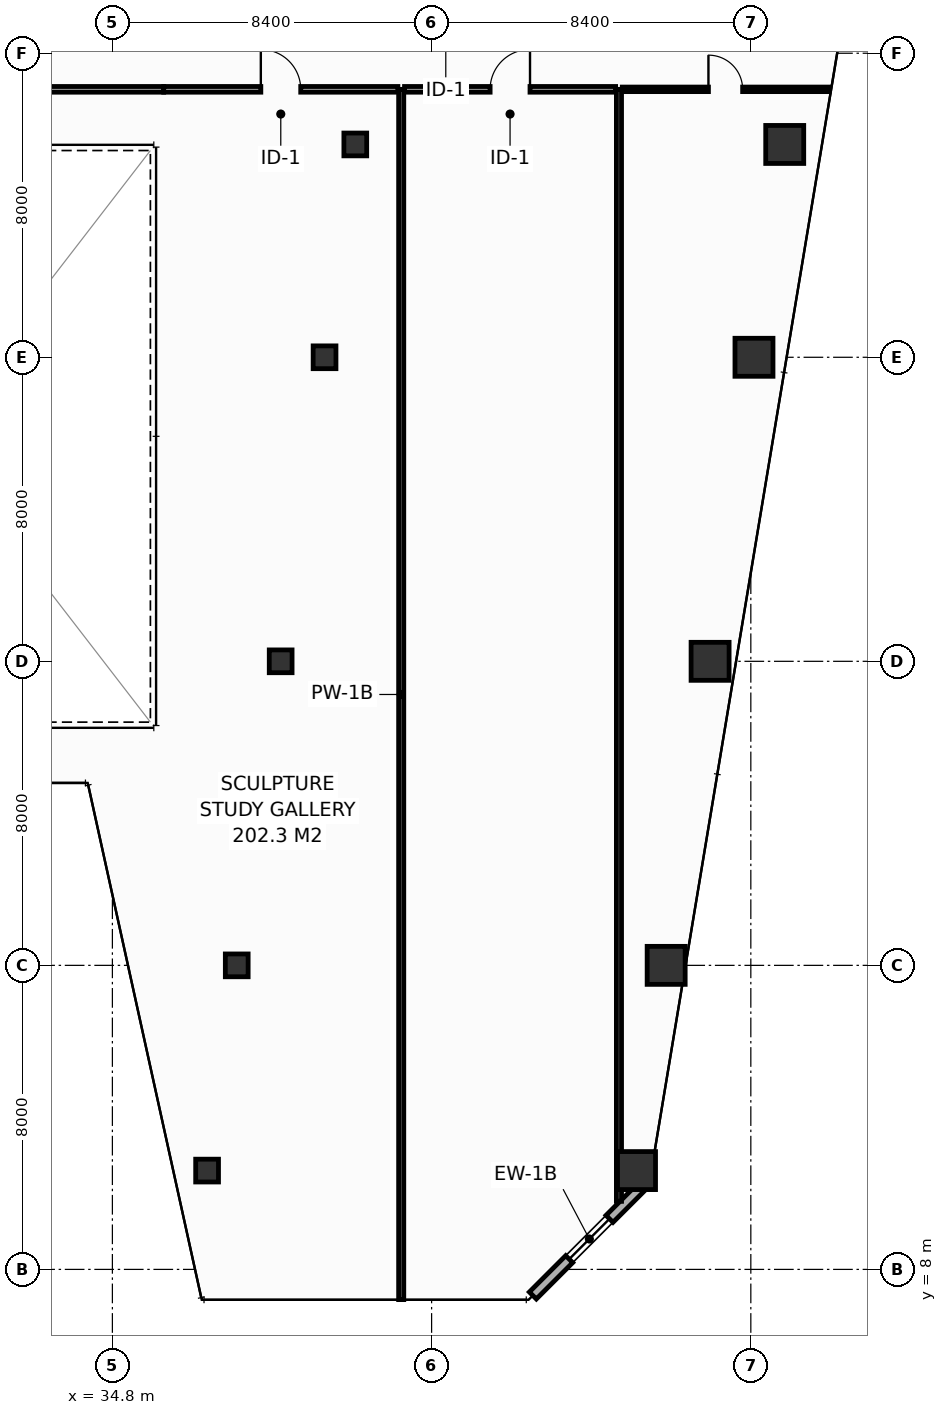
"""IFC4 building model, lengths in metres.
Left out: names, types, materials, properties, quantities, classifications, styles, units other than length and angle.
Written with IfcOpenShell. Run it as: python <this file> out.ifc"""

import sys

from ifc_helpers import new_model, si_unit, direction, frame, frame_2d, origin, origin_2d, place, context, subcontext, project, spatial, rectangle, hollow_rectangle, extrude, element, fill, save


model = new_model("IFC4")
c1 = context("Model", 3, precision=1e-05, world=origin(), true_north=direction((0.0, 1.0)))
c2 = subcontext(c1, "Body", "Model", "MODEL_VIEW")
j1 = project(units=[si_unit("LENGTHUNIT", "METRE"), si_unit("PLANEANGLEUNIT", "RADIAN")], contexts=[c1])
p1 = place(None, origin())
s1 = spatial("IfcSite", under=j1, at=p1, CompositionType="ELEMENT")
p2 = place(p1, origin())
s2 = spatial("IfcBuilding", under=s1, at=p2, CompositionType="ELEMENT")
p3 = place(p2, frame((0.0, 0.0, 114.8)))
s3 = spatial("IfcBuildingStorey", under=s2, at=p3, CompositionType="ELEMENT", Elevation=114.8)
p4 = place(p3, frame((48.592, 10.6, 0.0), z_axis=(0.0, 0.0, 1.0), x_axis=(1.0, 0.0, 0.0)))
e1 = element("IfcColumn", 1, at=p4, inside=s3, PredefinedType="COLUMN", context=c2, shape_type="SweptSolid", body=[
    extrude(hollow_rectangle(XDim=1.0, YDim=1.0, WallThickness=0.045, at=origin_2d()), origin(), (0.0, 0.0, 1.0), 4.4),
])
p5 = place(p3, frame((37.292, 10.6, 0.0), z_axis=(0.0, 0.0, 1.0), x_axis=(1.0, 0.0, 0.0)))
e2 = element("IfcColumn", 2, at=p5, inside=s3, PredefinedType="COLUMN", context=c2, shape_type="SweptSolid", body=[
    extrude(hollow_rectangle(XDim=0.6, YDim=0.6, WallThickness=0.028, at=origin_2d()), origin(), (0.0, 0.0, 1.0), 4.4),
])
p6 = place(p3, frame((49.372, 16.0, 0.0), z_axis=(0.0, 0.0, 1.0), x_axis=(1.0, 0.0, 0.0)))
e3 = element("IfcColumn", 3, at=p6, inside=s3, PredefinedType="COLUMN", context=c2, shape_type="SweptSolid", body=[
    extrude(hollow_rectangle(XDim=1.0, YDim=1.0, WallThickness=0.045, at=origin_2d()), origin(), (0.0, 0.0, 1.0), 4.4),
])
p7 = place(p3, frame((38.072, 16.0, 0.0), z_axis=(0.0, 0.0, 1.0), x_axis=(1.0, 0.0, 0.0)))
e4 = element("IfcColumn", 4, at=p7, inside=s3, PredefinedType="COLUMN", context=c2, shape_type="SweptSolid", body=[
    extrude(hollow_rectangle(XDim=0.6, YDim=0.6, WallThickness=0.028, at=origin_2d()), origin(), (0.0, 0.0, 1.0), 4.4),
])
p8 = place(p3, frame((50.528, 24.0, 0.0), z_axis=(0.0, 0.0, 1.0), x_axis=(1.0, 0.0, 0.0)))
e5 = element("IfcColumn", 5, at=p8, inside=s3, PredefinedType="COLUMN", context=c2, shape_type="SweptSolid", body=[
    extrude(hollow_rectangle(XDim=1.0, YDim=1.0, WallThickness=0.045, at=origin_2d()), origin(), (0.0, 0.0, 1.0), 4.4),
])
p9 = place(p3, frame((39.228, 24.0, 0.0), z_axis=(0.0, 0.0, 1.0), x_axis=(1.0, 0.0, 0.0)))
e6 = element("IfcColumn", 6, at=p9, inside=s3, PredefinedType="COLUMN", context=c2, shape_type="SweptSolid", body=[
    extrude(hollow_rectangle(XDim=0.6, YDim=0.6, WallThickness=0.028, at=origin_2d()), origin(), (0.0, 0.0, 1.0), 4.4),
])
p10 = place(p3, frame((51.683, 32.0, 0.0), z_axis=(0.0, 0.0, 1.0), x_axis=(1.0, 0.0, 0.0)))
e7 = element("IfcColumn", 7, at=p10, inside=s3, PredefinedType="COLUMN", context=c2, shape_type="SweptSolid", body=[
    extrude(hollow_rectangle(XDim=1.0, YDim=1.0, WallThickness=0.045, at=origin_2d()), origin(), (0.0, 0.0, 1.0), 4.4),
])
p11 = place(p3, frame((40.383, 32.0, 0.0), z_axis=(0.0, 0.0, 1.0), x_axis=(1.0, 0.0, 0.0)))
e8 = element("IfcColumn", 8, at=p11, inside=s3, PredefinedType="COLUMN", context=c2, shape_type="SweptSolid", body=[
    extrude(hollow_rectangle(XDim=0.6, YDim=0.6, WallThickness=0.028, at=origin_2d()), origin(), (0.0, 0.0, 1.0), 4.4),
])
p12 = place(p3, frame((52.492, 37.6, 0.0), z_axis=(0.0, 0.0, 1.0), x_axis=(1.0, 0.0, 0.0)))
e9 = element("IfcColumn", 9, at=p12, inside=s3, PredefinedType="COLUMN", context=c2, shape_type="SweptSolid", body=[
    extrude(hollow_rectangle(XDim=1.0, YDim=1.0, WallThickness=0.045, at=origin_2d()), origin(), (0.0, 0.0, 1.0), 4.4),
])
p13 = place(p3, frame((41.192, 37.6, 0.0), z_axis=(0.0, 0.0, 1.0), x_axis=(1.0, 0.0, 0.0)))
e10 = element("IfcColumn", 10, at=p13, inside=s3, PredefinedType="COLUMN", context=c2, shape_type="SweptSolid", body=[
    extrude(hollow_rectangle(XDim=0.6, YDim=0.6, WallThickness=0.028, at=origin_2d()), origin(), (0.0, 0.0, 1.0), 4.4),
])
p14 = place(p3, frame((45.864, 7.313, 0.0), z_axis=(0.0, 0.0, 1.0), x_axis=(0.70707775441, 0.707135806771, 0.0)))
e11 = element("IfcWall", 11, at=p14, inside=s3, PredefinedType="STANDARD", context=c2, shape_type="SweptSolid", body=[
    extrude(rectangle(XDim=4.206, YDim=0.26, at=frame_2d((2.103, 0.0))), origin(), (0.0, 0.0, 1.0), 4.15),
])
p15 = place(p14, frame((1.353, 0.0, 0.9)))
e12 = element("IfcOpeningElement", 12, at=p15, cuts=e11, PredefinedType="OPENING", context=c2, shape_type="SweptSolid", body=[
    extrude(rectangle(XDim=1.5, YDim=1.85, at=frame_2d((0.75, 0.925))), frame((0.0, 0.14, 0.0), z_axis=(0.0, -1.0, 0.0), x_axis=(1.0, 0.0, 0.0)), (0.0, 0.0, 1.0), 0.28),
])
p16 = place(p3, frame((42.4, 7.205, 0.0), z_axis=(0.0, 0.0, 1.0), x_axis=(0.0, 1.0, 0.0)))
e13 = element("IfcWall", 13, at=p16, inside=s3, PredefinedType="PARTITIONING", context=c2, shape_type="SweptSolid", body=[
    extrude(rectangle(XDim=31.845, YDim=0.135, at=frame_2d((15.922, 0.0))), origin(), (0.0, 0.0, 1.0), 3.335),
])
p17 = place(p3, frame((48.13, 9.791, 0.0), z_axis=(0.0, 0.0, 1.0), x_axis=(0.0, 1.0, 0.0)))
e14 = element("IfcWall", 14, at=p17, inside=s3, PredefinedType="PARTITIONING", context=c2, shape_type="SweptSolid", body=[
    extrude(rectangle(XDim=29.259, YDim=0.135, at=frame_2d((14.629, 0.0))), origin(), (0.0, 0.0, 1.0), 3.335),
])
p18 = place(p3, frame((23.85, 39.05, 0.0), z_axis=(0.0, 0.0, 1.0), x_axis=(1.0, 0.0, 0.0)))
e15 = element("IfcWall", 15, at=p18, inside=s3, PredefinedType="PARTITIONING", context=c2, shape_type="SweptSolid", body=[
    extrude(rectangle(XDim=12.3, YDim=0.15, at=frame_2d((6.15, 0.0))), origin(), (0.0, 0.0, 1.0), 4.15),
])
p19 = place(p3, frame((36.15, 39.05, 0.0), z_axis=(0.0, 0.0, 1.0), x_axis=(1.0, 0.0, 0.0)))
e16 = element("IfcWall", 16, at=p19, inside=s3, PredefinedType="PARTITIONING", context=c2, shape_type="SweptSolid", body=[
    extrude(rectangle(XDim=6.163, YDim=0.15, at=frame_2d((3.081, 0.0))), origin(), (0.0, 0.0, 1.0), 3.335),
])
p20 = place(p19, frame((2.556, 0.0, 0.0)))
e17 = element("IfcOpeningElement", 17, at=p20, cuts=e16, PredefinedType="OPENING", context=c2, shape_type="SweptSolid", body=[
    extrude(rectangle(XDim=1.05, YDim=2.15, at=frame_2d((0.525, 1.075))), frame((0.0, 0.085, 0.0), z_axis=(0.0, -1.0, 0.0), x_axis=(1.0, 0.0, 0.0)), (0.0, 0.0, 1.0), 0.17),
])
p21 = place(p3, frame((42.488, 39.05, 0.0), z_axis=(0.0, 0.0, 1.0), x_axis=(1.0, 0.0, 0.0)))
e18 = element("IfcWall", 18, at=p21, inside=s3, PredefinedType="PARTITIONING", context=c2, shape_type="SweptSolid", body=[
    extrude(rectangle(XDim=5.555, YDim=0.15, at=frame_2d((2.777, 0.0))), origin(), (0.0, 0.0, 1.0), 4.15),
])
p22 = place(p21, frame((2.252, 0.0, 0.0)))
e19 = element("IfcOpeningElement", 19, at=p22, cuts=e18, PredefinedType="OPENING", context=c2, shape_type="SweptSolid", body=[
    extrude(rectangle(XDim=1.05, YDim=2.15, at=frame_2d((0.525, 1.075))), frame((0.0, 0.085, 0.0), z_axis=(0.0, -1.0, 0.0), x_axis=(1.0, 0.0, 0.0)), (0.0, 0.0, 1.0), 0.17),
])
p23 = place(p3, frame((48.218, 39.05, 0.0), z_axis=(0.0, 0.0, 1.0), x_axis=(1.0, 0.0, 0.0)))
e20 = element("IfcWall", 20, at=p23, inside=s3, PredefinedType="PARTITIONING", context=c2, shape_type="SweptSolid", body=[
    extrude(rectangle(XDim=5.434, YDim=0.12, at=frame_2d((2.717, 0.0))), origin(), (0.0, 0.0, 1.0), 3.635),
])
p24 = place(p23, frame((2.267, 0.0, 0.0)))
e21 = element("IfcOpeningElement", 21, at=p24, cuts=e20, PredefinedType="OPENING", context=c2, shape_type="SweptSolid", body=[
    extrude(rectangle(XDim=0.9, YDim=2.1, at=frame_2d((0.45, 1.05))), frame((0.0, 0.07, 0.0), z_axis=(0.0, -1.0, 0.0), x_axis=(1.0, 0.0, 0.0)), (0.0, 0.0, 1.0), 0.14),
])
p25 = place(p15, origin())
e22 = element("IfcWindow", 22, at=p25, inside=s3, PartitioningType="SINGLE_PANEL", PredefinedType="WINDOW", context=c2, shape_type="SweptSolid", body=[
    extrude(rectangle(XDim=1.5, YDim=1.85, at=frame_2d((0.75, 0.925))), frame((0.0, 0.03, 0.0), z_axis=(0.0, -1.0, 0.0), x_axis=(1.0, 0.0, 0.0)), (0.0, 0.0, 1.0), 0.06),
])
fill(e12, e22)
p26 = place(p20, origin())
e23 = element("IfcDoor", 23, at=p26, inside=s3, OperationType="SINGLE_SWING_LEFT", PredefinedType="DOOR", context=c2, shape_type="SweptSolid", body=[
    extrude(rectangle(XDim=1.05, YDim=2.15, at=frame_2d((0.525, 1.075))), frame((0.0, 0.025, 0.0), z_axis=(0.0, -1.0, 0.0), x_axis=(1.0, 0.0, 0.0)), (0.0, 0.0, 1.0), 0.05),
])
fill(e17, e23)
p27 = place(p22, origin())
e24 = element("IfcDoor", 24, at=p27, inside=s3, OperationType="SINGLE_SWING_RIGHT", PredefinedType="DOOR", context=c2, shape_type="SweptSolid", body=[
    extrude(rectangle(XDim=1.05, YDim=2.15, at=frame_2d((0.525, 1.075))), frame((0.0, 0.025, 0.0), z_axis=(0.0, -1.0, 0.0), x_axis=(1.0, 0.0, 0.0)), (0.0, 0.0, 1.0), 0.05),
])
fill(e19, e24)
p28 = place(p24, origin())
e25 = element("IfcDoor", 25, at=p28, inside=s3, OperationType="SINGLE_SWING_LEFT", PredefinedType="DOOR", context=c2, shape_type="SweptSolid", body=[
    extrude(rectangle(XDim=0.9, YDim=2.1, at=frame_2d((0.45, 1.05))), frame((0.0, 0.025, 0.0), z_axis=(0.0, -1.0, 0.0), x_axis=(1.0, 0.0, 0.0)), (0.0, 0.0, 1.0), 0.05),
])
fill(e21, e25)
save(model, sys.argv[1])
